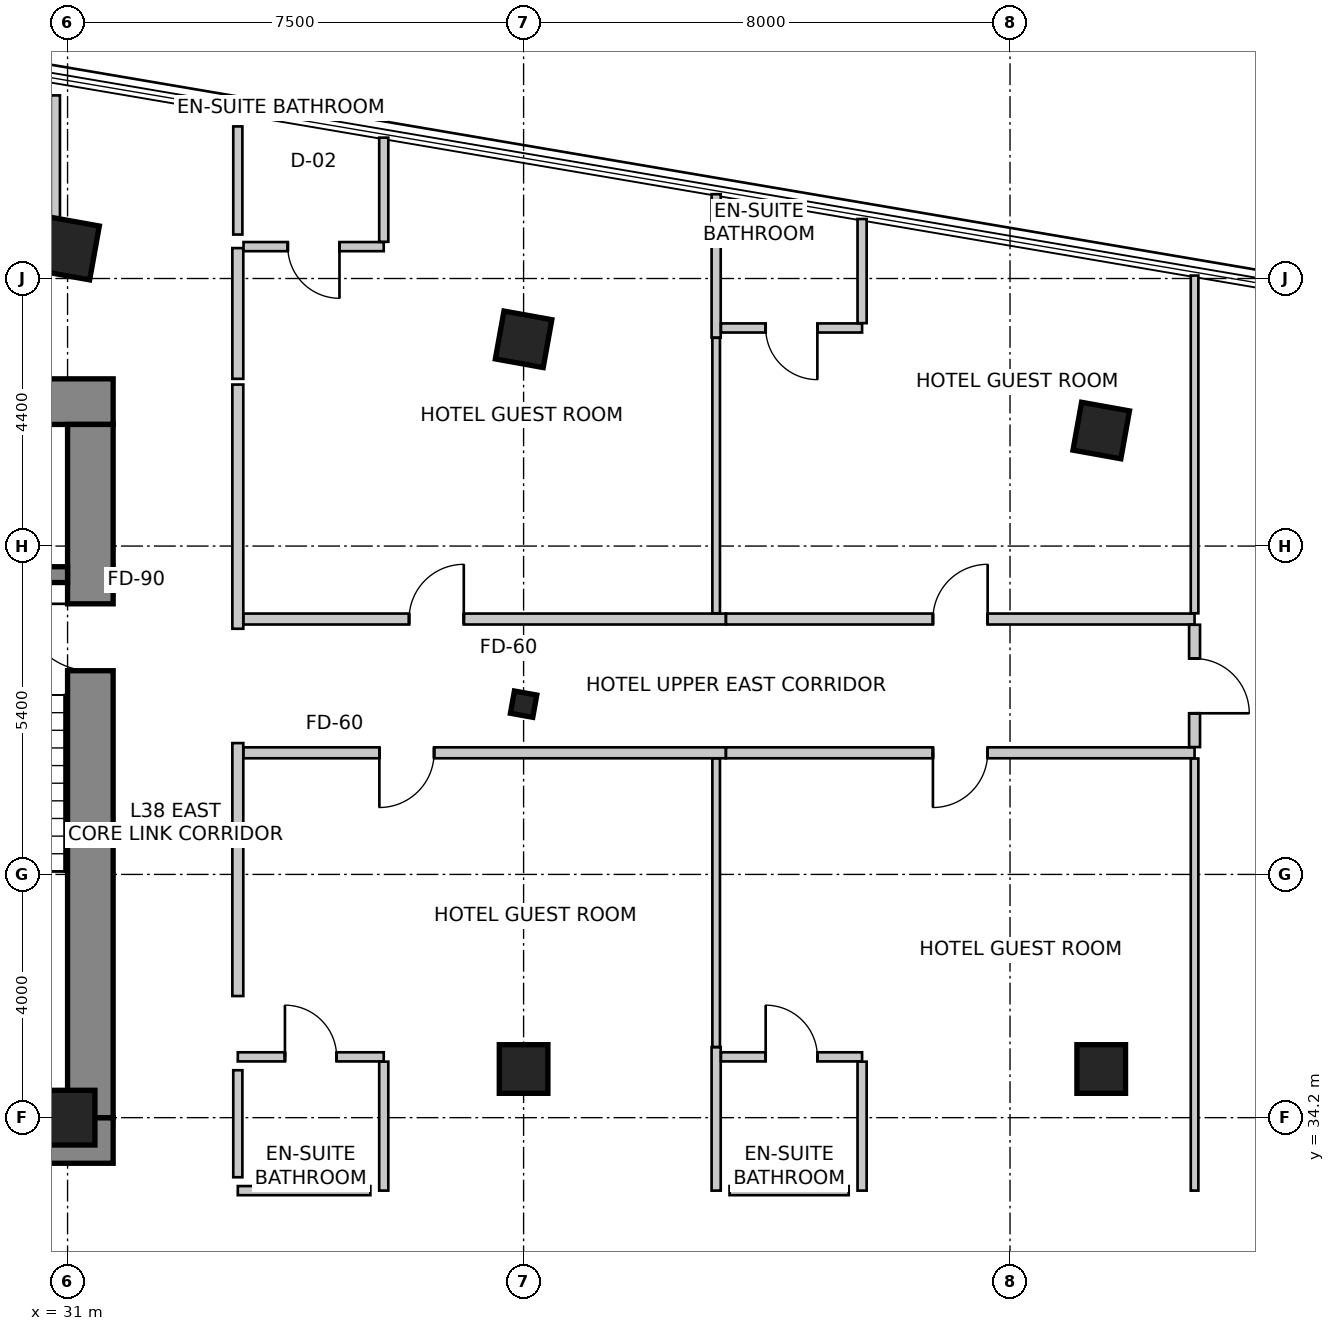
"""IFC4 building model, lengths in metres.
Left out: names, types, materials, properties, quantities, classifications, styles, units other than length and angle.
Written with IfcOpenShell. Run it as: python <this file> out.ifc"""

import sys

from ifc_helpers import new_model, si_unit, direction, frame, frame_2d, origin, origin_2d, place, context, subcontext, project, spatial, rectangle, i_section, extrude, source, transform, mapped, element, fill, save


model = new_model("IFC4")
c1 = context("Model", 3, precision=1e-05, world=origin(), true_north=direction((0.0, 1.0)))
c2 = subcontext(c1, "Body", "Model", "MODEL_VIEW")
j1 = project(units=[si_unit("LENGTHUNIT", "METRE"), si_unit("PLANEANGLEUNIT", "RADIAN")], contexts=[c1])
p1 = place(None, origin())
s1 = spatial("IfcSite", under=j1, at=p1, CompositionType="ELEMENT")
p2 = place(p1, origin())
s2 = spatial("IfcBuilding", under=s1, at=p2, CompositionType="ELEMENT")
p3 = place(p2, frame((0.0, 0.0, 153.8)))
s3 = spatial("IfcBuildingStorey", under=s2, at=p3, CompositionType="ELEMENT", Elevation=153.8)
p4 = place(p3, frame((15.85, 45.975, 0.0), z_axis=(0.0, 0.0, 1.0), x_axis=(1.0, 0.0, 0.0)))
e1 = element("IfcWall", 1, at=p4, inside=s3, PredefinedType="SHEAR", context=c2, shape_type="SweptSolid", body=[
    extrude(rectangle(XDim=15.9, YDim=0.75, at=frame_2d((7.95, 0.0))), origin(), (0.0, 0.0, 1.0), 3.6),
])
p5 = place(p3, frame((15.85, 33.825, 0.0), z_axis=(0.0, 0.0, 1.0), x_axis=(1.0, 0.0, 0.0)))
e2 = element("IfcWall", 2, at=p5, inside=s3, PredefinedType="SHEAR", context=c2, shape_type="SweptSolid", body=[
    extrude(rectangle(XDim=15.9, YDim=0.75, at=frame_2d((7.95, 0.0))), origin(), (0.0, 0.0, 1.0), 3.6),
])
m1 = source(origin(), c2, "Body", "SweptSolid", [
    extrude(rectangle(XDim=1.3, YDim=2.15, at=frame_2d((0.65, 1.075))), frame((0.0, 0.385, 0.0), z_axis=(0.0, -1.0, 0.0), x_axis=(1.0, 0.0, 0.0)), (0.0, 0.0, 1.0), 0.77),
])
p6 = place(p5, frame((10.08, 0.0, 0.0)))
e3 = element("IfcOpeningElement", 3, at=p6, cuts=e2, PredefinedType="OPENING", context=c2, shape_type="MappedRepresentation", body=[
    mapped(m1, transform((0.0, 0.0, 0.0), scale=1.0)),
])
p7 = place(p3, frame((31.375, 34.2, 0.0), z_axis=(0.0, 0.0, 1.0), x_axis=(0.0, 1.0, 0.0)))
e4 = element("IfcWall", 4, at=p7, inside=s3, PredefinedType="SHEAR", context=c2, shape_type="SweptSolid", body=[
    extrude(rectangle(XDim=11.4, YDim=0.75, at=frame_2d((5.7, 0.0))), origin(), (0.0, 0.0, 1.0), 3.6),
])
m2 = source(origin(), c2, "Body", "SweptSolid", [
    extrude(rectangle(XDim=1.1, YDim=2.15, at=frame_2d((0.55, 1.075))), frame((0.0, 0.385, 0.0), z_axis=(0.0, -1.0, 0.0), x_axis=(1.0, 0.0, 0.0)), (0.0, 0.0, 1.0), 0.77),
])
p8 = place(p7, frame((7.35, 0.0, 0.0)))
e5 = element("IfcOpeningElement", 5, at=p8, cuts=e4, PredefinedType="OPENING", context=c2, shape_type="MappedRepresentation", body=[
    mapped(m2, transform((0.0, 0.0, 0.0), scale=1.0)),
])
p9 = place(p3, frame((27.5, 43.13, 0.0), z_axis=(0.0, 0.0, 1.0), x_axis=(1.0, 0.0, 0.0)))
e6 = element("IfcWall", 6, at=p9, inside=s3, PredefinedType="SHEAR", context=c2, shape_type="SweptSolid", body=[
    extrude(rectangle(XDim=3.5, YDim=0.26, at=frame_2d((1.75, 0.0))), origin(), (0.0, 0.0, 1.0), 3.6),
])
m3 = source(origin(), c2, "Body", "SweptSolid", [
    extrude(rectangle(XDim=0.9, YDim=0.9, at=origin_2d()), origin(), (0.0, 0.0, 1.0), 3.6),
])
p10 = place(p3, frame((31.0, 48.5, 0.0), z_axis=(0.0, 0.0, 1.0), x_axis=(0.984195607969, -0.17708474032, 0.0)))
e7 = element("IfcColumn", 7, at=p10, inside=s3, PredefinedType="COLUMN", context=c2, shape_type="MappedRepresentation", body=[
    mapped(m3, transform((0.0, 0.0, 0.0), scale=1.0)),
])
m4 = source(origin(), c2, "Body", "SweptSolid", [
    extrude(rectangle(XDim=0.8, YDim=0.8, at=origin_2d()), origin(), (0.0, 0.0, 1.0), 3.6),
])
for number, where, z_axis, x_axis in (
    (8, (38.5, 47.0, 0.0), (0.0, 0.0, 1.0), (0.984, -0.177, 0.0)),
    (9, (48.0, 45.5, 0.0), (0.0, 0.0, 1.0), (0.984, -0.177, 0.0)),
):
    element("IfcColumn", number, at=place(p3, frame(where, z_axis=z_axis, x_axis=x_axis)), inside=s3, PredefinedType="COLUMN", context=c2, shape_type="MappedRepresentation", body=[
        mapped(m4, transform((0.0, 0.0, 0.0), scale=1.0)),
    ])
p11 = place(p3, frame((31.0, 34.2, 0.0), z_axis=(0.0, 0.0, 1.0), x_axis=(1.0, 0.0, 0.0)))
e10 = element("IfcColumn", 10, at=p11, inside=s3, PredefinedType="COLUMN", context=c2, shape_type="MappedRepresentation", body=[
    mapped(m3, transform((0.0, 0.0, 0.0), scale=1.0)),
])
for number, where, z_axis, x_axis in (
    (11, (38.5, 35.0, 0.0), (0.0, 0.0, 1.0), (1.0, 0.0, 0.0)),
    (12, (48.0, 35.0, 0.0), (0.0, 0.0, 1.0), (1.0, 0.0, 0.0)),
):
    element("IfcColumn", number, at=place(p3, frame(where, z_axis=z_axis, x_axis=x_axis)), inside=s3, PredefinedType="COLUMN", context=c2, shape_type="MappedRepresentation", body=[
        mapped(m4, transform((0.0, 0.0, 0.0), scale=1.0)),
    ])
m5 = source(origin(), c2, "Body", "SweptSolid", [
    extrude(i_section(OverallWidth=0.374, OverallDepth=0.372, WebThickness=0.016, FlangeThickness=0.026, FilletRadius=0.015, at=origin_2d()), origin(), (0.0, 0.0, 1.0), 3.6),
])
p12 = place(p3, frame((38.5, 41.0, 0.0), z_axis=(0.0, 0.0, 1.0), x_axis=(0.984195607969, -0.17708474032, 0.0)))
e13 = element("IfcColumn", 13, at=p12, inside=s3, PredefinedType="COLUMN", context=c2, shape_type="MappedRepresentation", body=[
    mapped(m5, transform((0.0, 0.0, 0.0), scale=1.0)),
])
p13 = place(p3, frame((23.962, 48.5, 0.0), z_axis=(0.0, 0.0, 1.0), x_axis=(1.0, 0.0, 0.0)))
e14 = element("IfcWall", 14, at=p13, inside=s3, PredefinedType="PARTITIONING", context=c2, shape_type="SweptSolid", body=[
    extrude(rectangle(XDim=6.998, YDim=0.18, at=frame_2d((3.499, 0.0))), origin(), (0.0, 0.0, 1.0), 2.492),
])
m6 = source(origin(), c2, "Body", "SweptSolid", [
    extrude(rectangle(XDim=0.85, YDim=2.15, at=frame_2d((0.425, 1.075))), frame((0.0, 0.1, 0.0), z_axis=(0.0, -1.0, 0.0), x_axis=(1.0, 0.0, 0.0)), (0.0, 0.0, 1.0), 0.2),
])
p14 = place(p13, frame((3.074, 0.0, 0.0)))
e15 = element("IfcOpeningElement", 15, at=p14, cuts=e14, PredefinedType="OPENING", context=c2, shape_type="MappedRepresentation", body=[
    mapped(m6, transform((0.0, 0.0, 0.0), scale=1.0)),
])
p15 = place(p3, frame((33.8, 48.5, 0.0), z_axis=(0.0, 0.0, 1.0), x_axis=(0.0, -1.0, 0.0)))
e16 = element("IfcWall", 16, at=p15, inside=s3, PredefinedType="PARTITIONING", context=c2, shape_type="SweptSolid", body=[
    extrude(rectangle(XDim=2.15, YDim=0.18, at=frame_2d((1.075, 0.0))), origin(), (0.0, 0.0, 1.0), 2.492),
])
p16 = place(p3, frame((33.8, 46.256, 0.0), z_axis=(0.0, 0.0, 1.0), x_axis=(0.0, -1.0, 0.0)))
e17 = element("IfcWall", 17, at=p16, inside=s3, PredefinedType="PARTITIONING", context=c2, shape_type="SweptSolid", body=[
    extrude(rectangle(XDim=4.016, YDim=0.18, at=frame_2d((2.008, 0.0))), origin(), (0.0, 0.0, 1.0), 2.922),
])
p17 = place(p3, frame((33.8, 40.36, 0.0), z_axis=(0.0, 0.0, 1.0), x_axis=(0.0, -1.0, 0.0)))
e18 = element("IfcWall", 18, at=p17, inside=s3, PredefinedType="PARTITIONING", context=c2, shape_type="SweptSolid", body=[
    extrude(rectangle(XDim=4.16, YDim=0.18, at=frame_2d((2.08, 0.0))), origin(), (0.0, 0.0, 1.0), 3.35),
])
p18 = place(p3, frame((33.894, 42.4, 0.0), z_axis=(0.0, 0.0, 1.0), x_axis=(1.0, 0.0, 0.0)))
e19 = element("IfcWall", 19, at=p18, inside=s3, PredefinedType="PARTITIONING", context=c2, shape_type="SweptSolid", body=[
    extrude(rectangle(XDim=7.933, YDim=0.18, at=frame_2d((3.966, 0.0))), origin(), (0.0, 0.0, 1.0), 2.803),
])
m7 = source(origin(), c2, "Body", "SweptSolid", [
    extrude(rectangle(XDim=0.9, YDim=2.15, at=frame_2d((0.45, 1.075))), frame((0.0, 0.1, 0.0), z_axis=(0.0, -1.0, 0.0), x_axis=(1.0, 0.0, 0.0)), (0.0, 0.0, 1.0), 0.2),
])
p19 = place(p18, frame((2.723, 0.0, 0.0)))
e20 = element("IfcOpeningElement", 20, at=p19, cuts=e19, PredefinedType="OPENING", context=c2, shape_type="MappedRepresentation", body=[
    mapped(m7, transform((0.0, 0.0, 0.0), scale=1.0)),
])
p20 = place(p3, frame((41.827, 40.2, 0.0), z_axis=(0.0, 0.0, 1.0), x_axis=(-1.0, 0.0, 0.0)))
e21 = element("IfcWall", 21, at=p20, inside=s3, PredefinedType="PARTITIONING", context=c2, shape_type="SweptSolid", body=[
    extrude(rectangle(XDim=7.933, YDim=0.18, at=frame_2d((3.966, 0.0))), origin(), (0.0, 0.0, 1.0), 2.803),
])
p21 = place(p20, frame((4.799, 0.0, 0.0)))
e22 = element("IfcOpeningElement", 22, at=p21, cuts=e21, PredefinedType="OPENING", context=c2, shape_type="MappedRepresentation", body=[
    mapped(m7, transform((0.0, 0.0, 0.0), scale=1.0)),
])
p22 = place(p3, frame((41.829, 42.4, 0.0), z_axis=(0.0, 0.0, 1.0), x_axis=(1.0, 0.0, 0.0)))
e23 = element("IfcWall", 23, at=p22, inside=s3, PredefinedType="PARTITIONING", context=c2, shape_type="SweptSolid", body=[
    extrude(rectangle(XDim=7.706, YDim=0.18, at=frame_2d((3.853, 0.0))), origin(), (0.0, 0.0, 1.0), 2.803),
])
p23 = place(p22, frame((3.403, 0.0, 0.0)))
e24 = element("IfcOpeningElement", 24, at=p23, cuts=e23, PredefinedType="OPENING", context=c2, shape_type="MappedRepresentation", body=[
    mapped(m7, transform((0.0, 0.0, 0.0), scale=1.0)),
])
p24 = place(p3, frame((49.535, 40.2, 0.0), z_axis=(0.0, 0.0, 1.0), x_axis=(-1.0, 0.0, 0.0)))
e25 = element("IfcWall", 25, at=p24, inside=s3, PredefinedType="PARTITIONING", context=c2, shape_type="SweptSolid", body=[
    extrude(rectangle(XDim=7.706, YDim=0.18, at=frame_2d((3.853, 0.0))), origin(), (0.0, 0.0, 1.0), 2.803),
])
p25 = place(p24, frame((3.403, 0.0, 0.0)))
e26 = element("IfcOpeningElement", 26, at=p25, cuts=e25, PredefinedType="OPENING", context=c2, shape_type="MappedRepresentation", body=[
    mapped(m7, transform((0.0, 0.0, 0.0), scale=1.0)),
])
p26 = place(p3, frame((49.535, 42.306, 0.0), z_axis=(0.0, 0.0, 1.0), x_axis=(0.0, -1.0, 0.0)))
e27 = element("IfcWall", 27, at=p26, inside=s3, PredefinedType="PARTITIONING", context=c2, shape_type="SweptSolid", body=[
    extrude(rectangle(XDim=2.012, YDim=0.18, at=frame_2d((1.006, 0.0))), origin(), (0.0, 0.0, 1.0), 3.35),
])
p27 = place(p26, frame((0.556, 0.0, 0.0)))
e28 = element("IfcOpeningElement", 28, at=p27, cuts=e27, PredefinedType="OPENING", context=c2, shape_type="MappedRepresentation", body=[
    mapped(m7, transform((0.0, 0.0, 0.0), scale=1.0)),
])
p28 = place(p3, frame((36.2, 48.524, 0.0), z_axis=(0.0, 0.0, 1.0), x_axis=(-1.0, 0.0, 0.0)))
e29 = element("IfcWall", 29, at=p28, inside=s3, PredefinedType="PARTITIONING", context=c2, shape_type="SweptSolid", body=[
    extrude(rectangle(XDim=2.306, YDim=0.15, at=frame_2d((1.153, 0.0))), origin(), (0.0, 0.0, 1.0), 3.35),
])
m8 = source(origin(), c2, "Body", "SweptSolid", [
    extrude(rectangle(XDim=0.85, YDim=2.15, at=frame_2d((0.425, 1.075))), frame((0.0, 0.085, 0.0), z_axis=(0.0, -1.0, 0.0), x_axis=(1.0, 0.0, 0.0)), (0.0, 0.0, 1.0), 0.17),
])
p29 = place(p28, frame((0.728, 0.0, 0.0)))
e30 = element("IfcOpeningElement", 30, at=p29, cuts=e29, PredefinedType="OPENING", context=c2, shape_type="MappedRepresentation", body=[
    mapped(m8, transform((0.0, 0.0, 0.0), scale=1.0)),
])
p30 = place(p3, frame((36.2, 50.316, 0.0), z_axis=(0.0, 0.0, 1.0), x_axis=(0.0, -1.0, 0.0)))
e31 = element("IfcWall", 31, at=p30, inside=s3, PredefinedType="PARTITIONING", context=c2, shape_type="SweptSolid", body=[
    extrude(rectangle(XDim=1.713, YDim=0.15, at=frame_2d((0.856, 0.0))), origin(), (0.0, 0.0, 1.0), 3.35),
])
p31 = place(p3, frame((41.667, 49.387, 0.0), z_axis=(0.0, 0.0, 1.0), x_axis=(0.0, -1.0, 0.0)))
e32 = element("IfcWall", 32, at=p31, inside=s3, PredefinedType="PARTITIONING", context=c2, shape_type="SweptSolid", body=[
    extrude(rectangle(XDim=2.36, YDim=0.15, at=frame_2d((1.18, 0.0))), origin(), (0.0, 0.0, 1.0), 3.35),
])
p32 = place(p3, frame((41.667, 47.025, 0.0), z_axis=(0.0, 0.0, 1.0), x_axis=(0.0, -1.0, 0.0)))
e33 = element("IfcWall", 33, at=p32, inside=s3, PredefinedType="PARTITIONING", context=c2, shape_type="SweptSolid", body=[
    extrude(rectangle(XDim=4.531, YDim=0.125, at=frame_2d((2.265, 0.0))), origin(), (0.0, 0.0, 1.0), 2.492),
])
p33 = place(p3, frame((33.8, 35.2, 0.0), z_axis=(0.0, 0.0, 1.0), x_axis=(1.0, 0.0, 0.0)))
e34 = element("IfcWall", 34, at=p33, inside=s3, PredefinedType="PARTITIONING", context=c2, shape_type="SweptSolid", body=[
    extrude(rectangle(XDim=2.4, YDim=0.15, at=frame_2d((1.2, 0.0))), origin(), (0.0, 0.0, 1.0), 3.35),
])
p34 = place(p33, frame((0.775, 0.0, 0.0)))
e35 = element("IfcOpeningElement", 35, at=p34, cuts=e34, PredefinedType="OPENING", context=c2, shape_type="MappedRepresentation", body=[
    mapped(m8, transform((0.0, 0.0, 0.0), scale=1.0)),
])
p35 = place(p3, frame((36.2, 35.121, 0.0), z_axis=(0.0, 0.0, 1.0), x_axis=(0.0, -1.0, 0.0)))
e36 = element("IfcWall", 36, at=p35, inside=s3, PredefinedType="PARTITIONING", context=c2, shape_type="SweptSolid", body=[
    extrude(rectangle(XDim=2.121, YDim=0.15, at=frame_2d((1.061, 0.0))), origin(), (0.0, 0.0, 1.0), 3.35),
])
p36 = place(p3, frame((41.667, 35.36, 0.0), z_axis=(0.0, 0.0, 1.0), x_axis=(0.0, -1.0, 0.0)))
e37 = element("IfcWall", 37, at=p36, inside=s3, PredefinedType="PARTITIONING", context=c2, shape_type="SweptSolid", body=[
    extrude(rectangle(XDim=2.36, YDim=0.15, at=frame_2d((1.18, 0.0))), origin(), (0.0, 0.0, 1.0), 2.492),
])
p37 = place(p3, frame((41.667, 40.106, 0.0), z_axis=(0.0, 0.0, 1.0), x_axis=(0.0, -1.0, 0.0)))
e38 = element("IfcWall", 38, at=p37, inside=s3, PredefinedType="PARTITIONING", context=c2, shape_type="SweptSolid", body=[
    extrude(rectangle(XDim=4.744, YDim=0.125, at=frame_2d((2.372, 0.0))), origin(), (0.0, 0.0, 1.0), 2.922),
])
p38 = place(p3, frame((44.067, 47.187, 0.0), z_axis=(0.0, 0.0, 1.0), x_axis=(-1.0, 0.0, 0.0)))
e39 = element("IfcWall", 39, at=p38, inside=s3, PredefinedType="PARTITIONING", context=c2, shape_type="SweptSolid", body=[
    extrude(rectangle(XDim=2.321, YDim=0.15, at=frame_2d((1.16, 0.0))), origin(), (0.0, 0.0, 1.0), 3.35),
])
p39 = place(p38, frame((0.736, 0.0, 0.0)))
e40 = element("IfcOpeningElement", 40, at=p39, cuts=e39, PredefinedType="OPENING", context=c2, shape_type="MappedRepresentation", body=[
    mapped(m8, transform((0.0, 0.0, 0.0), scale=1.0)),
])
p40 = place(p3, frame((44.067, 48.979, 0.0), z_axis=(0.0, 0.0, 1.0), x_axis=(0.0, -1.0, 0.0)))
e41 = element("IfcWall", 41, at=p40, inside=s3, PredefinedType="PARTITIONING", context=c2, shape_type="SweptSolid", body=[
    extrude(rectangle(XDim=1.713, YDim=0.15, at=frame_2d((0.856, 0.0))), origin(), (0.0, 0.0, 1.0), 3.35),
])
p41 = place(p3, frame((49.535, 48.049, 0.0), z_axis=(0.0, 0.0, 1.0), x_axis=(0.0, -1.0, 0.0)))
e42 = element("IfcWall", 42, at=p41, inside=s3, PredefinedType="PARTITIONING", context=c2, shape_type="SweptSolid", body=[
    extrude(rectangle(XDim=5.555, YDim=0.125, at=frame_2d((2.777, 0.0))), origin(), (0.0, 0.0, 1.0), 3.35),
])
p42 = place(p3, frame((41.746, 35.2, 0.0), z_axis=(0.0, 0.0, 1.0), x_axis=(1.0, 0.0, 0.0)))
e43 = element("IfcWall", 43, at=p42, inside=s3, PredefinedType="PARTITIONING", context=c2, shape_type="SweptSolid", body=[
    extrude(rectangle(XDim=2.321, YDim=0.15, at=frame_2d((1.16, 0.0))), origin(), (0.0, 0.0, 1.0), 2.492),
])
p43 = place(p42, frame((0.736, 0.0, 0.0)))
e44 = element("IfcOpeningElement", 44, at=p43, cuts=e43, PredefinedType="OPENING", context=c2, shape_type="MappedRepresentation", body=[
    mapped(m8, transform((0.0, 0.0, 0.0), scale=1.0)),
])
p44 = place(p3, frame((44.067, 35.121, 0.0), z_axis=(0.0, 0.0, 1.0), x_axis=(0.0, -1.0, 0.0)))
e45 = element("IfcWall", 45, at=p44, inside=s3, PredefinedType="PARTITIONING", context=c2, shape_type="SweptSolid", body=[
    extrude(rectangle(XDim=2.121, YDim=0.15, at=frame_2d((1.061, 0.0))), origin(), (0.0, 0.0, 1.0), 2.492),
])
p45 = place(p3, frame((49.535, 40.106, 0.0), z_axis=(0.0, 0.0, 1.0), x_axis=(0.0, -1.0, 0.0)))
e46 = element("IfcWall", 46, at=p45, inside=s3, PredefinedType="PARTITIONING", context=c2, shape_type="SweptSolid", body=[
    extrude(rectangle(XDim=7.106, YDim=0.125, at=frame_2d((3.553, 0.0))), origin(), (0.0, 0.0, 1.0), 3.35),
])
p46 = place(p3, frame((30.8, 51.011, 0.0), z_axis=(0.0, 0.0, 1.0), x_axis=(0.0, -1.0, 0.0)))
e47 = element("IfcWall", 47, at=p46, inside=s3, PredefinedType="PARTITIONING", context=c2, shape_type="SweptSolid", body=[
    extrude(rectangle(XDim=2.292, YDim=0.15, at=frame_2d((1.146, 0.0))), origin(), (0.0, 0.0, 1.0), 3.35),
])
p47 = place(p3, frame((33.8, 48.723, 0.0), z_axis=(0.0, 0.0, 1.0), x_axis=(0.0, 1.0, 0.0)))
e48 = element("IfcWall", 48, at=p47, inside=s3, PredefinedType="PARTITIONING", context=c2, shape_type="SweptSolid", body=[
    extrude(rectangle(XDim=1.778, YDim=0.15, at=frame_2d((0.889, 0.0))), origin(), (0.0, 0.0, 1.0), 3.35),
])
p48 = place(p3, frame((35.98, 33.0, 0.0), z_axis=(0.0, 0.0, 1.0), x_axis=(-1.0, 0.0, 0.0)))
e49 = element("IfcWall", 49, at=p48, inside=s3, PredefinedType="PARTITIONING", context=c2, shape_type="SweptSolid", body=[
    extrude(rectangle(XDim=2.18, YDim=0.15, at=frame_2d((1.09, 0.0))), origin(), (0.0, 0.0, 1.0), 3.35),
])
p49 = place(p3, frame((33.8, 33.22, 0.0), z_axis=(0.0, 0.0, 1.0), x_axis=(0.0, 1.0, 0.0)))
e50 = element("IfcWall", 50, at=p49, inside=s3, PredefinedType="PARTITIONING", context=c2, shape_type="SweptSolid", body=[
    extrude(rectangle(XDim=1.76, YDim=0.15, at=frame_2d((0.88, 0.0))), origin(), (0.0, 0.0, 1.0), 3.35),
])
p50 = place(p3, frame((43.847, 33.0, 0.0), z_axis=(0.0, 0.0, 1.0), x_axis=(-1.0, 0.0, 0.0)))
e51 = element("IfcWall", 51, at=p50, inside=s3, PredefinedType="PARTITIONING", context=c2, shape_type="SweptSolid", body=[
    extrude(rectangle(XDim=1.96, YDim=0.15, at=frame_2d((0.98, 0.0))), origin(), (0.0, 0.0, 1.0), 3.35),
])
m9 = source(origin(), c2, "Body", "SweptSolid", [
    extrude(rectangle(XDim=1.1, YDim=2.15, at=frame_2d((0.55, 1.075))), frame((0.0, 0.025, 0.0), z_axis=(0.0, -1.0, 0.0), x_axis=(1.0, 0.0, 0.0)), (0.0, 0.0, 1.0), 0.05),
])
p51 = place(p8, origin())
e52 = element("IfcDoor", 52, at=p51, inside=s3, OperationType="SINGLE_SWING_RIGHT", PredefinedType="DOOR", context=c2, shape_type="MappedRepresentation", body=[
    mapped(m9, transform((0.0, 0.0, 0.0), scale=1.0)),
])
fill(e5, e52)
m10 = source(origin(), c2, "Body", "SweptSolid", [
    extrude(rectangle(XDim=0.85, YDim=2.15, at=frame_2d((0.425, 1.075))), frame((0.0, 0.025, 0.0), z_axis=(0.0, -1.0, 0.0), x_axis=(1.0, 0.0, 0.0)), (0.0, 0.0, 1.0), 0.05),
])
p52 = place(p29, origin())
e53 = element("IfcDoor", 53, at=p52, inside=s3, OperationType="SINGLE_SWING_LEFT", PredefinedType="DOOR", context=c2, shape_type="MappedRepresentation", body=[
    mapped(m10, transform((0.0, 0.0, 0.0), scale=1.0)),
])
fill(e30, e53)
m11 = source(origin(), c2, "Body", "SweptSolid", [
    extrude(rectangle(XDim=0.9, YDim=2.15, at=frame_2d((0.45, 1.075))), frame((0.0, 0.025, 0.0), z_axis=(0.0, -1.0, 0.0), x_axis=(1.0, 0.0, 0.0)), (0.0, 0.0, 1.0), 0.05),
])
p53 = place(p19, origin())
e54 = element("IfcDoor", 54, at=p53, inside=s3, OperationType="SINGLE_SWING_RIGHT", PredefinedType="DOOR", context=c2, shape_type="MappedRepresentation", body=[
    mapped(m11, transform((0.0, 0.0, 0.0), scale=1.0)),
])
fill(e20, e54)
p54 = place(p34, origin())
e55 = element("IfcDoor", 55, at=p54, inside=s3, OperationType="SINGLE_SWING_LEFT", PredefinedType="DOOR", context=c2, shape_type="MappedRepresentation", body=[
    mapped(m10, transform((0.0, 0.0, 0.0), scale=1.0)),
])
fill(e35, e55)
p55 = place(p21, origin())
e56 = element("IfcDoor", 56, at=p55, inside=s3, OperationType="SINGLE_SWING_RIGHT", PredefinedType="DOOR", context=c2, shape_type="MappedRepresentation", body=[
    mapped(m11, transform((0.0, 0.0, 0.0), scale=1.0)),
])
fill(e22, e56)
p56 = place(p39, origin())
e57 = element("IfcDoor", 57, at=p56, inside=s3, OperationType="SINGLE_SWING_LEFT", PredefinedType="DOOR", context=c2, shape_type="MappedRepresentation", body=[
    mapped(m10, transform((0.0, 0.0, 0.0), scale=1.0)),
])
fill(e40, e57)
p57 = place(p23, origin())
e58 = element("IfcDoor", 58, at=p57, inside=s3, OperationType="SINGLE_SWING_RIGHT", PredefinedType="DOOR", context=c2, shape_type="MappedRepresentation", body=[
    mapped(m11, transform((0.0, 0.0, 0.0), scale=1.0)),
])
fill(e24, e58)
p58 = place(p43, origin())
e59 = element("IfcDoor", 59, at=p58, inside=s3, OperationType="SINGLE_SWING_LEFT", PredefinedType="DOOR", context=c2, shape_type="MappedRepresentation", body=[
    mapped(m10, transform((0.0, 0.0, 0.0), scale=1.0)),
])
fill(e44, e59)
p59 = place(p25, origin())
e60 = element("IfcDoor", 60, at=p59, inside=s3, OperationType="SINGLE_SWING_RIGHT", PredefinedType="DOOR", context=c2, shape_type="MappedRepresentation", body=[
    mapped(m11, transform((0.0, 0.0, 0.0), scale=1.0)),
])
fill(e26, e60)
p60 = place(p27, origin())
e61 = element("IfcDoor", 61, at=p60, inside=s3, OperationType="SINGLE_SWING_RIGHT", PredefinedType="DOOR", context=c2, shape_type="MappedRepresentation", body=[
    mapped(m11, transform((0.0, 0.0, 0.0), scale=1.0)),
])
fill(e28, e61)
save(model, sys.argv[1])
